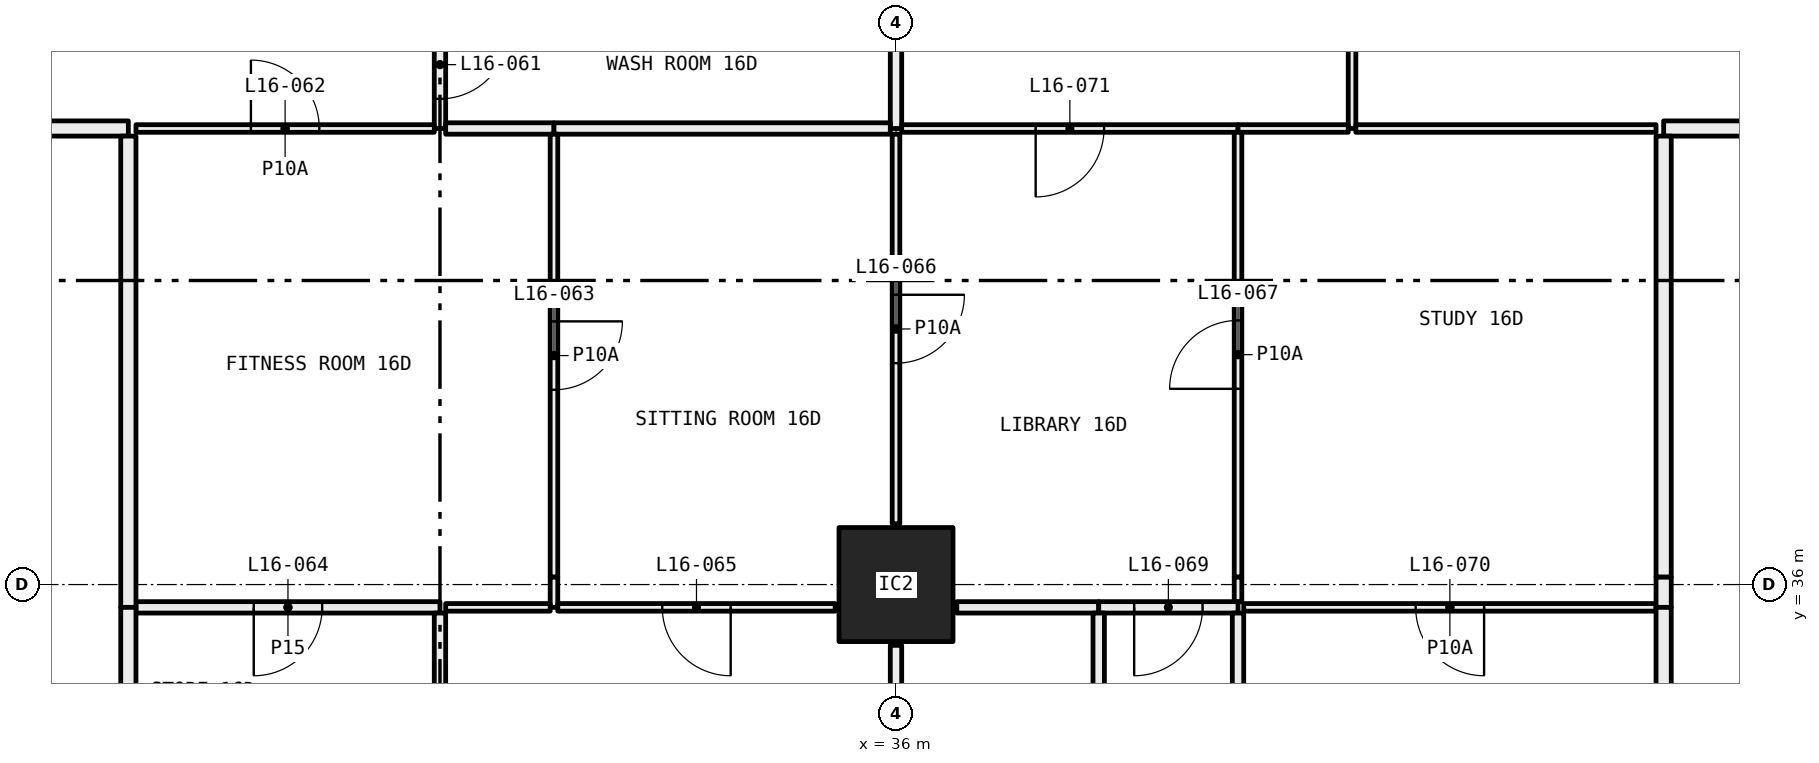
"""IFC4 building model, lengths in metres.
Left out: names, types, materials, properties, quantities, classifications, styles, units other than length and angle.
Written with IfcOpenShell. Run it as: python <this file> out.ifc"""

import sys

from ifc_helpers import new_model, si_unit, direction, frame, frame_2d, origin, origin_2d, place, context, subcontext, project, spatial, rectangle, hollow_rectangle, extrude, element, fill, save


model = new_model("IFC4")
c1 = context("Model", 3, precision=1e-05, world=origin(), true_north=direction((0.0, 1.0)))
c2 = subcontext(c1, "Body", "Model", "MODEL_VIEW")
j1 = project(units=[si_unit("LENGTHUNIT", "METRE"), si_unit("PLANEANGLEUNIT", "RADIAN")], contexts=[c1])
p1 = place(None, origin())
s1 = spatial("IfcSite", under=j1, at=p1, CompositionType="ELEMENT")
p2 = place(p1, origin())
s2 = spatial("IfcBuilding", under=s1, at=p2, CompositionType="ELEMENT")
p3 = place(p2, frame((0.0, 0.0, 67.95)))
s3 = spatial("IfcBuildingStorey", under=s2, at=p3, CompositionType="ELEMENT", Elevation=67.95)
p4 = place(p3, frame((36.0, 36.0, 0.0), z_axis=(0.0, 0.0, 1.0), x_axis=(1.0, 0.0, 0.0)))
e1 = element("IfcColumn", 1, at=p4, inside=s3, PredefinedType="COLUMN", context=c2, shape_type="SweptSolid", body=[
    extrude(hollow_rectangle(XDim=1.5, YDim=1.5, WallThickness=0.065, at=origin_2d()), origin(), (0.0, 0.0, 1.0), 3.05),
])
p5 = place(p3, frame((30.0, 42.0, 0.0), z_axis=(0.0, 0.0, 1.0), x_axis=(0.0, 1.0, 0.0)))
e2 = element("IfcWall", 2, at=p5, inside=s3, PredefinedType="PARTITIONING", context=c2, shape_type="SweptSolid", body=[
    extrude(rectangle(XDim=1.68, YDim=0.15, at=frame_2d((0.84, 0.0))), origin(), (0.0, 0.0, 1.0), 3.05),
])
p6 = place(p5, frame((0.39, 0.0, 0.0)))
e3 = element("IfcOpeningElement", 3, at=p6, cuts=e2, PredefinedType="OPENING", context=c2, shape_type="SweptSolid", body=[
    extrude(rectangle(XDim=0.9, YDim=2.1, at=frame_2d((0.45, 1.05))), frame((0.0, 0.085, 0.0), z_axis=(0.0, -1.0, 0.0), x_axis=(1.0, 0.0, 0.0)), (0.0, 0.0, 1.0), 0.17),
])
p7 = place(p3, frame((26.0, 42.0, 0.0), z_axis=(0.0, 0.0, 1.0), x_axis=(1.0, 0.0, 0.0)))
e4 = element("IfcWall", 4, at=p7, inside=s3, PredefinedType="PARTITIONING", context=c2, shape_type="SweptSolid", body=[
    extrude(rectangle(XDim=3.925, YDim=0.1, at=frame_2d((1.962, 0.0))), origin(), (0.0, 0.0, 1.0), 3.05),
])
p8 = place(p7, frame((1.512, 0.0, 0.0)))
e5 = element("IfcOpeningElement", 5, at=p8, cuts=e4, PredefinedType="OPENING", context=c2, shape_type="SweptSolid", body=[
    extrude(rectangle(XDim=0.9, YDim=2.1, at=frame_2d((0.45, 1.05))), frame((0.0, 0.06, 0.0), z_axis=(0.0, -1.0, 0.0), x_axis=(1.0, 0.0, 0.0)), (0.0, 0.0, 1.0), 0.12),
])
p9 = place(p3, frame((24.0, 42.0, 0.0), z_axis=(0.0, 0.0, 1.0), x_axis=(1.0, 0.0, 0.0)))
e6 = element("IfcWall", 6, at=p9, inside=s3, PredefinedType="PARTITIONING", context=c2, shape_type="SweptSolid", body=[
    extrude(rectangle(XDim=1.9, YDim=0.2, at=frame_2d((0.95, 0.0))), origin(), (0.0, 0.0, 1.0), 3.05),
])
p10 = place(p3, frame((36.0, 42.0, 0.0), z_axis=(0.0, 0.0, 1.0), x_axis=(0.0, 1.0, 0.0)))
e7 = element("IfcWall", 7, at=p10, inside=s3, PredefinedType="PARTITIONING", context=c2, shape_type="SweptSolid", body=[
    extrude(rectangle(XDim=1.605, YDim=0.15, at=frame_2d((0.802, 0.0))), origin(), (0.0, 0.0, 1.0), 2.45),
])
p11 = place(p3, frame((30.075, 42.0, 0.0), z_axis=(0.0, 0.0, 1.0), x_axis=(1.0, 0.0, 0.0)))
e8 = element("IfcWall", 8, at=p11, inside=s3, PredefinedType="PARTITIONING", context=c2, shape_type="SweptSolid", body=[
    extrude(rectangle(XDim=1.425, YDim=0.15, at=frame_2d((0.712, 0.0))), origin(), (0.0, 0.0, 1.0), 3.05),
])
p12 = place(p3, frame((31.5, 42.0, 0.0), z_axis=(0.0, 0.0, 1.0), x_axis=(1.0, 0.0, 0.0)))
e9 = element("IfcWall", 9, at=p12, inside=s3, PredefinedType="PARTITIONING", context=c2, shape_type="SweptSolid", body=[
    extrude(rectangle(XDim=4.425, YDim=0.15, at=frame_2d((2.212, 0.0))), origin(), (0.0, 0.0, 1.0), 2.45),
])
p13 = place(p3, frame((42.0, 42.0, 0.0), z_axis=(0.0, 0.0, 1.0), x_axis=(0.0, 1.0, 0.0)))
e10 = element("IfcWall", 10, at=p13, inside=s3, PredefinedType="PARTITIONING", context=c2, shape_type="SweptSolid", body=[
    extrude(rectangle(XDim=5.28, YDim=0.1, at=frame_2d((2.64, 0.0))), origin(), (0.0, 0.0, 1.0), 3.05),
])
p14 = place(p13, frame((2.19, 0.0, 0.0)))
e11 = element("IfcOpeningElement", 11, at=p14, cuts=e10, PredefinedType="OPENING", context=c2, shape_type="SweptSolid", body=[
    extrude(rectangle(XDim=0.9, YDim=2.1, at=frame_2d((0.45, 1.05))), frame((0.0, 0.06, 0.0), z_axis=(0.0, -1.0, 0.0), x_axis=(1.0, 0.0, 0.0)), (0.0, 0.0, 1.0), 0.12),
])
p15 = place(p3, frame((36.075, 42.0, 0.0), z_axis=(0.0, 0.0, 1.0), x_axis=(1.0, 0.0, 0.0)))
e12 = element("IfcWall", 12, at=p15, inside=s3, PredefinedType="PARTITIONING", context=c2, shape_type="SweptSolid", body=[
    extrude(rectangle(XDim=4.425, YDim=0.1, at=frame_2d((2.212, 0.0))), origin(), (0.0, 0.0, 1.0), 2.45),
])
p16 = place(p15, frame((1.762, 0.0, 0.0)))
e13 = element("IfcOpeningElement", 13, at=p16, cuts=e12, PredefinedType="OPENING", context=c2, shape_type="SweptSolid", body=[
    extrude(rectangle(XDim=0.9, YDim=2.1, at=frame_2d((0.45, 1.05))), frame((0.0, 0.06, 0.0), z_axis=(0.0, -1.0, 0.0), x_axis=(1.0, 0.0, 0.0)), (0.0, 0.0, 1.0), 0.12),
])
p17 = place(p3, frame((40.5, 42.0, 0.0), z_axis=(0.0, 0.0, 1.0), x_axis=(1.0, 0.0, 0.0)))
e14 = element("IfcWall", 14, at=p17, inside=s3, PredefinedType="PARTITIONING", context=c2, shape_type="SweptSolid", body=[
    extrude(rectangle(XDim=1.45, YDim=0.1, at=frame_2d((0.725, 0.0))), origin(), (0.0, 0.0, 1.0), 3.05),
])
p18 = place(p3, frame((42.05, 42.0, 0.0), z_axis=(0.0, 0.0, 1.0), x_axis=(1.0, 0.0, 0.0)))
e15 = element("IfcWall", 15, at=p18, inside=s3, PredefinedType="PARTITIONING", context=c2, shape_type="SweptSolid", body=[
    extrude(rectangle(XDim=3.95, YDim=0.1, at=frame_2d((1.975, 0.0))), origin(), (0.0, 0.0, 1.0), 3.05),
])
p19 = place(p3, frame((46.1, 42.0, 0.0), z_axis=(0.0, 0.0, 1.0), x_axis=(1.0, 0.0, 0.0)))
e16 = element("IfcWall", 16, at=p19, inside=s3, PredefinedType="PARTITIONING", context=c2, shape_type="SweptSolid", body=[
    extrude(rectangle(XDim=1.9, YDim=0.2, at=frame_2d((0.95, 0.0))), origin(), (0.0, 0.0, 1.0), 3.05),
])
p20 = place(p3, frame((31.5, 35.7, 0.0), z_axis=(0.0, 0.0, 1.0), x_axis=(0.0, 1.0, 0.0)))
e17 = element("IfcWall", 17, at=p20, inside=s3, PredefinedType="PARTITIONING", context=c2, shape_type="SweptSolid", body=[
    extrude(rectangle(XDim=0.4, YDim=0.1, at=frame_2d((0.2, 0.0))), origin(), (0.0, 0.0, 1.0), 2.45),
])
p21 = place(p3, frame((31.5, 36.1, 0.0), z_axis=(0.0, 0.0, 1.0), x_axis=(0.0, 1.0, 0.0)))
e18 = element("IfcWall", 18, at=p21, inside=s3, PredefinedType="PARTITIONING", context=c2, shape_type="SweptSolid", body=[
    extrude(rectangle(XDim=5.825, YDim=0.1, at=frame_2d((2.913, 0.0))), origin(), (0.0, 0.0, 1.0), 3.05),
])
p22 = place(p21, frame((2.462, 0.0, 0.0)))
e19 = element("IfcOpeningElement", 19, at=p22, cuts=e18, PredefinedType="OPENING", context=c2, shape_type="SweptSolid", body=[
    extrude(rectangle(XDim=0.9, YDim=2.1, at=frame_2d((0.45, 1.05))), frame((0.0, 0.06, 0.0), z_axis=(0.0, -1.0, 0.0), x_axis=(1.0, 0.0, 0.0)), (0.0, 0.0, 1.0), 0.12),
])
p23 = place(p3, frame((26.0, 35.7, 0.0), z_axis=(0.0, 0.0, 1.0), x_axis=(1.0, 0.0, 0.0)))
e20 = element("IfcWall", 20, at=p23, inside=s3, PredefinedType="PARTITIONING", context=c2, shape_type="SweptSolid", body=[
    extrude(rectangle(XDim=4.0, YDim=0.15, at=frame_2d((2.0, 0.0))), origin(), (0.0, 0.0, 1.0), 3.05),
])
p24 = place(p23, frame((1.55, 0.0, 0.0)))
e21 = element("IfcOpeningElement", 21, at=p24, cuts=e20, PredefinedType="OPENING", context=c2, shape_type="SweptSolid", body=[
    extrude(rectangle(XDim=0.9, YDim=2.1, at=frame_2d((0.45, 1.05))), frame((0.0, 0.085, 0.0), z_axis=(0.0, -1.0, 0.0), x_axis=(1.0, 0.0, 0.0)), (0.0, 0.0, 1.0), 0.17),
])
p25 = place(p3, frame((30.075, 35.7, 0.0), z_axis=(0.0, 0.0, 1.0), x_axis=(1.0, 0.0, 0.0)))
e22 = element("IfcWall", 22, at=p25, inside=s3, PredefinedType="PARTITIONING", context=c2, shape_type="SweptSolid", body=[
    extrude(rectangle(XDim=1.375, YDim=0.1, at=frame_2d((0.688, 0.0))), origin(), (0.0, 0.0, 1.0), 3.05),
])
p26 = place(p3, frame((25.9, 41.9, 0.0), z_axis=(0.0, 0.0, 1.0), x_axis=(0.0, -1.0, 0.0)))
e23 = element("IfcWall", 23, at=p26, inside=s3, PredefinedType="PARTITIONING", context=c2, shape_type="SweptSolid", body=[
    extrude(rectangle(XDim=6.2, YDim=0.2, at=frame_2d((3.1, 0.0))), origin(), (0.0, 0.0, 1.0), 2.45),
])
p27 = place(p3, frame((31.55, 35.7, 0.0), z_axis=(0.0, 0.0, 1.0), x_axis=(1.0, 0.0, 0.0)))
e24 = element("IfcWall", 24, at=p27, inside=s3, PredefinedType="PARTITIONING", context=c2, shape_type="SweptSolid", body=[
    extrude(rectangle(XDim=3.65, YDim=0.1, at=frame_2d((1.825, 0.0))), origin(), (0.0, 0.0, 1.0), 3.05),
])
p28 = place(p27, frame((1.375, 0.0, 0.0)))
e25 = element("IfcOpeningElement", 25, at=p28, cuts=e24, PredefinedType="OPENING", context=c2, shape_type="SweptSolid", body=[
    extrude(rectangle(XDim=0.9, YDim=2.1, at=frame_2d((0.45, 1.05))), frame((0.0, 0.06, 0.0), z_axis=(0.0, -1.0, 0.0), x_axis=(1.0, 0.0, 0.0)), (0.0, 0.0, 1.0), 0.12),
])
p29 = place(p3, frame((36.0, 36.8, 0.0), z_axis=(0.0, 0.0, 1.0), x_axis=(0.0, 1.0, 0.0)))
e26 = element("IfcWall", 26, at=p29, inside=s3, PredefinedType="PARTITIONING", context=c2, shape_type="SweptSolid", body=[
    extrude(rectangle(XDim=5.125, YDim=0.1, at=frame_2d((2.562, 0.0))), origin(), (0.0, 0.0, 1.0), 2.45),
])
p30 = place(p29, frame((2.113, 0.0, 0.0)))
e27 = element("IfcOpeningElement", 27, at=p30, cuts=e26, PredefinedType="OPENING", context=c2, shape_type="SweptSolid", body=[
    extrude(rectangle(XDim=0.9, YDim=2.1, at=frame_2d((0.45, 1.05))), frame((0.0, 0.06, 0.0), z_axis=(0.0, -1.0, 0.0), x_axis=(1.0, 0.0, 0.0)), (0.0, 0.0, 1.0), 0.12),
])
p31 = place(p3, frame((30.0, 33.675, 0.0), z_axis=(0.0, 0.0, 1.0), x_axis=(0.0, 1.0, 0.0)))
e28 = element("IfcWall", 28, at=p31, inside=s3, PredefinedType="PARTITIONING", context=c2, shape_type="SweptSolid", body=[
    extrude(rectangle(XDim=1.95, YDim=0.15, at=frame_2d((0.975, 0.0))), origin(), (0.0, 0.0, 1.0), 3.05),
])
p32 = place(p3, frame((25.9, 35.7, 0.0), z_axis=(0.0, 0.0, 1.0), x_axis=(0.0, -1.0, 0.0)))
e29 = element("IfcWall", 29, at=p32, inside=s3, PredefinedType="PARTITIONING", context=c2, shape_type="SweptSolid", body=[
    extrude(rectangle(XDim=2.1, YDim=0.2, at=frame_2d((1.05, 0.0))), origin(), (0.0, 0.0, 1.0), 3.05),
])
p33 = place(p3, frame((36.0, 31.3, 0.0), z_axis=(0.0, 0.0, 1.0), x_axis=(0.0, 1.0, 0.0)))
e30 = element("IfcWall", 30, at=p33, inside=s3, PredefinedType="PARTITIONING", context=c2, shape_type="SweptSolid", body=[
    extrude(rectangle(XDim=3.9, YDim=0.15, at=frame_2d((1.95, 0.0))), origin(), (0.0, 0.0, 1.0), 2.45),
])
p34 = place(p33, frame((1.5, 0.0, 0.0)))
e31 = element("IfcOpeningElement", 31, at=p34, cuts=e30, PredefinedType="OPENING", context=c2, shape_type="SweptSolid", body=[
    extrude(rectangle(XDim=0.9, YDim=2.1, at=frame_2d((0.45, 1.05))), frame((0.0, 0.085, 0.0), z_axis=(0.0, -1.0, 0.0), x_axis=(1.0, 0.0, 0.0)), (0.0, 0.0, 1.0), 0.17),
])
p35 = place(p3, frame((40.5, 35.775, 0.0), z_axis=(0.0, 0.0, 1.0), x_axis=(0.0, 1.0, 0.0)))
e32 = element("IfcWall", 32, at=p35, inside=s3, PredefinedType="PARTITIONING", context=c2, shape_type="SweptSolid", body=[
    extrude(rectangle(XDim=0.325, YDim=0.1, at=frame_2d((0.163, 0.0))), origin(), (0.0, 0.0, 1.0), 2.45),
])
p36 = place(p3, frame((40.5, 36.1, 0.0), z_axis=(0.0, 0.0, 1.0), x_axis=(0.0, 1.0, 0.0)))
e33 = element("IfcWall", 33, at=p36, inside=s3, PredefinedType="PARTITIONING", context=c2, shape_type="SweptSolid", body=[
    extrude(rectangle(XDim=5.85, YDim=0.1, at=frame_2d((2.925, 0.0))), origin(), (0.0, 0.0, 1.0), 3.05),
])
p37 = place(p36, frame((2.475, 0.0, 0.0)))
e34 = element("IfcOpeningElement", 34, at=p37, cuts=e33, PredefinedType="OPENING", context=c2, shape_type="SweptSolid", body=[
    extrude(rectangle(XDim=0.9, YDim=2.1, at=frame_2d((0.45, 1.05))), frame((0.0, 0.06, 0.0), z_axis=(0.0, -1.0, 0.0), x_axis=(1.0, 0.0, 0.0)), (0.0, 0.0, 1.0), 0.12),
])
p38 = place(p3, frame((36.8, 35.7, 0.0), z_axis=(0.0, 0.0, 1.0), x_axis=(1.0, 0.0, 0.0)))
e35 = element("IfcWall", 35, at=p38, inside=s3, PredefinedType="PARTITIONING", context=c2, shape_type="SweptSolid", body=[
    extrude(rectangle(XDim=1.867, YDim=0.15, at=frame_2d((0.934, 0.0))), origin(), (0.0, 0.0, 1.0), 3.05),
])
p39 = place(p3, frame((38.667, 35.7, 0.0), z_axis=(0.0, 0.0, 1.0), x_axis=(1.0, 0.0, 0.0)))
e36 = element("IfcWall", 36, at=p39, inside=s3, PredefinedType="PARTITIONING", context=c2, shape_type="SweptSolid", body=[
    extrude(rectangle(XDim=1.833, YDim=0.15, at=frame_2d((0.917, 0.0))), origin(), (0.0, 0.0, 1.0), 3.05),
])
p40 = place(p39, frame((0.467, 0.0, 0.0)))
e37 = element("IfcOpeningElement", 37, at=p40, cuts=e36, PredefinedType="OPENING", context=c2, shape_type="SweptSolid", body=[
    extrude(rectangle(XDim=0.9, YDim=2.1, at=frame_2d((0.45, 1.05))), frame((0.0, 0.085, 0.0), z_axis=(0.0, -1.0, 0.0), x_axis=(1.0, 0.0, 0.0)), (0.0, 0.0, 1.0), 0.17),
])
p41 = place(p3, frame((40.575, 35.7, 0.0), z_axis=(0.0, 0.0, 1.0), x_axis=(1.0, 0.0, 0.0)))
e38 = element("IfcWall", 38, at=p41, inside=s3, PredefinedType="PARTITIONING", context=c2, shape_type="SweptSolid", body=[
    extrude(rectangle(XDim=5.425, YDim=0.1, at=frame_2d((2.712, 0.0))), origin(), (0.0, 0.0, 1.0), 3.05),
])
p42 = place(p41, frame((2.262, 0.0, 0.0)))
e39 = element("IfcOpeningElement", 39, at=p42, cuts=e38, PredefinedType="OPENING", context=c2, shape_type="SweptSolid", body=[
    extrude(rectangle(XDim=0.9, YDim=2.1, at=frame_2d((0.45, 1.05))), frame((0.0, 0.06, 0.0), z_axis=(0.0, -1.0, 0.0), x_axis=(1.0, 0.0, 0.0)), (0.0, 0.0, 1.0), 0.12),
])
p43 = place(p3, frame((46.1, 35.7, 0.0), z_axis=(0.0, 0.0, 1.0), x_axis=(0.0, 1.0, 0.0)))
e40 = element("IfcWall", 40, at=p43, inside=s3, PredefinedType="PARTITIONING", context=c2, shape_type="SweptSolid", body=[
    extrude(rectangle(XDim=0.4, YDim=0.2, at=frame_2d((0.2, 0.0))), origin(), (0.0, 0.0, 1.0), 2.45),
])
p44 = place(p3, frame((46.1, 36.1, 0.0), z_axis=(0.0, 0.0, 1.0), x_axis=(0.0, 1.0, 0.0)))
e41 = element("IfcWall", 41, at=p44, inside=s3, PredefinedType="PARTITIONING", context=c2, shape_type="SweptSolid", body=[
    extrude(rectangle(XDim=5.8, YDim=0.2, at=frame_2d((2.9, 0.0))), origin(), (0.0, 0.0, 1.0), 3.05),
])
for number, where, z_axis, x_axis in (
    (42, (38.667, 31.3, 0.0), (0.0, 0.0, 1.0), (0.0, 1.0, 0.0)),
    (43, (40.5, 31.3, 0.0), (0.0, 0.0, 1.0), (0.0, 1.0, 0.0)),
):
    element("IfcWall", number, at=place(p3, frame(where, z_axis=z_axis, x_axis=x_axis)), inside=s3, PredefinedType="PARTITIONING", context=c2, shape_type="SweptSolid", body=[
        extrude(rectangle(XDim=4.325, YDim=0.15, at=frame_2d((2.163, 0.0))), origin(), (0.0, 0.0, 1.0), 3.05),
    ])
p45 = place(p3, frame((46.1, 31.3, 0.0), z_axis=(0.0, 0.0, 1.0), x_axis=(0.0, 1.0, 0.0)))
e44 = element("IfcWall", 44, at=p45, inside=s3, PredefinedType="PARTITIONING", context=c2, shape_type="SweptSolid", body=[
    extrude(rectangle(XDim=4.4, YDim=0.2, at=frame_2d((2.2, 0.0))), origin(), (0.0, 0.0, 1.0), 3.05),
])
p46 = place(p6, frame((0.9, 0.0, 0.0), x_axis=(-1.0, 0.0, 0.0)))
e45 = element("IfcDoor", 45, at=p46, inside=s3, OperationType="SINGLE_SWING_RIGHT", PredefinedType="DOOR", context=c2, shape_type="SweptSolid", body=[
    extrude(rectangle(XDim=0.9, YDim=2.1, at=frame_2d((0.45, 1.05))), frame((0.0, 0.025, 0.0), z_axis=(0.0, -1.0, 0.0), x_axis=(1.0, 0.0, 0.0)), (0.0, 0.0, 1.0), 0.05),
])
fill(e3, e45)
p47 = place(p8, origin())
e46 = element("IfcDoor", 46, at=p47, inside=s3, OperationType="SINGLE_SWING_RIGHT", PredefinedType="DOOR", context=c2, shape_type="SweptSolid", body=[
    extrude(rectangle(XDim=0.9, YDim=2.1, at=frame_2d((0.45, 1.05))), frame((0.0, 0.025, 0.0), z_axis=(0.0, -1.0, 0.0), x_axis=(1.0, 0.0, 0.0)), (0.0, 0.0, 1.0), 0.05),
])
fill(e5, e46)
p48 = place(p22, frame((0.9, 0.0, 0.0), x_axis=(-1.0, 0.0, 0.0)))
e47 = element("IfcDoor", 47, at=p48, inside=s3, OperationType="SINGLE_SWING_RIGHT", PredefinedType="DOOR", context=c2, shape_type="SweptSolid", body=[
    extrude(rectangle(XDim=0.9, YDim=2.1, at=frame_2d((0.45, 1.05))), frame((0.0, 0.025, 0.0), z_axis=(0.0, -1.0, 0.0), x_axis=(1.0, 0.0, 0.0)), (0.0, 0.0, 1.0), 0.05),
])
fill(e19, e47)
p49 = place(p24, frame((0.9, 0.0, 0.0), x_axis=(-1.0, 0.0, 0.0)))
e48 = element("IfcDoor", 48, at=p49, inside=s3, OperationType="SINGLE_SWING_LEFT", PredefinedType="DOOR", context=c2, shape_type="SweptSolid", body=[
    extrude(rectangle(XDim=0.9, YDim=2.1, at=frame_2d((0.45, 1.05))), frame((0.0, 0.025, 0.0), z_axis=(0.0, -1.0, 0.0), x_axis=(1.0, 0.0, 0.0)), (0.0, 0.0, 1.0), 0.05),
])
fill(e21, e48)
p50 = place(p28, frame((0.9, 0.0, 0.0), x_axis=(-1.0, 0.0, 0.0)))
e49 = element("IfcDoor", 49, at=p50, inside=s3, OperationType="SINGLE_SWING_RIGHT", PredefinedType="DOOR", context=c2, shape_type="SweptSolid", body=[
    extrude(rectangle(XDim=0.9, YDim=2.1, at=frame_2d((0.45, 1.05))), frame((0.0, 0.025, 0.0), z_axis=(0.0, -1.0, 0.0), x_axis=(1.0, 0.0, 0.0)), (0.0, 0.0, 1.0), 0.05),
])
fill(e25, e49)
p51 = place(p30, frame((0.9, 0.0, 0.0), x_axis=(-1.0, 0.0, 0.0)))
e50 = element("IfcDoor", 50, at=p51, inside=s3, OperationType="SINGLE_SWING_RIGHT", PredefinedType="DOOR", context=c2, shape_type="SweptSolid", body=[
    extrude(rectangle(XDim=0.9, YDim=2.1, at=frame_2d((0.45, 1.05))), frame((0.0, 0.025, 0.0), z_axis=(0.0, -1.0, 0.0), x_axis=(1.0, 0.0, 0.0)), (0.0, 0.0, 1.0), 0.05),
])
fill(e27, e50)
p52 = place(p37, origin())
e51 = element("IfcDoor", 51, at=p52, inside=s3, OperationType="SINGLE_SWING_RIGHT", PredefinedType="DOOR", context=c2, shape_type="SweptSolid", body=[
    extrude(rectangle(XDim=0.9, YDim=2.1, at=frame_2d((0.45, 1.05))), frame((0.0, 0.025, 0.0), z_axis=(0.0, -1.0, 0.0), x_axis=(1.0, 0.0, 0.0)), (0.0, 0.0, 1.0), 0.05),
])
fill(e34, e51)
p53 = place(p40, frame((0.9, 0.0, 0.0), x_axis=(-1.0, 0.0, 0.0)))
e52 = element("IfcDoor", 52, at=p53, inside=s3, OperationType="SINGLE_SWING_LEFT", PredefinedType="DOOR", context=c2, shape_type="SweptSolid", body=[
    extrude(rectangle(XDim=0.9, YDim=2.1, at=frame_2d((0.45, 1.05))), frame((0.0, 0.025, 0.0), z_axis=(0.0, -1.0, 0.0), x_axis=(1.0, 0.0, 0.0)), (0.0, 0.0, 1.0), 0.05),
])
fill(e37, e52)
p54 = place(p42, frame((0.9, 0.0, 0.0), x_axis=(-1.0, 0.0, 0.0)))
e53 = element("IfcDoor", 53, at=p54, inside=s3, OperationType="SINGLE_SWING_RIGHT", PredefinedType="DOOR", context=c2, shape_type="SweptSolid", body=[
    extrude(rectangle(XDim=0.9, YDim=2.1, at=frame_2d((0.45, 1.05))), frame((0.0, 0.025, 0.0), z_axis=(0.0, -1.0, 0.0), x_axis=(1.0, 0.0, 0.0)), (0.0, 0.0, 1.0), 0.05),
])
fill(e39, e53)
p55 = place(p16, frame((0.9, 0.0, 0.0), x_axis=(-1.0, 0.0, 0.0)))
e54 = element("IfcDoor", 54, at=p55, inside=s3, OperationType="SINGLE_SWING_LEFT", PredefinedType="DOOR", context=c2, shape_type="SweptSolid", body=[
    extrude(rectangle(XDim=0.9, YDim=2.1, at=frame_2d((0.45, 1.05))), frame((0.0, 0.025, 0.0), z_axis=(0.0, -1.0, 0.0), x_axis=(1.0, 0.0, 0.0)), (0.0, 0.0, 1.0), 0.05),
])
fill(e13, e54)
save(model, sys.argv[1])
